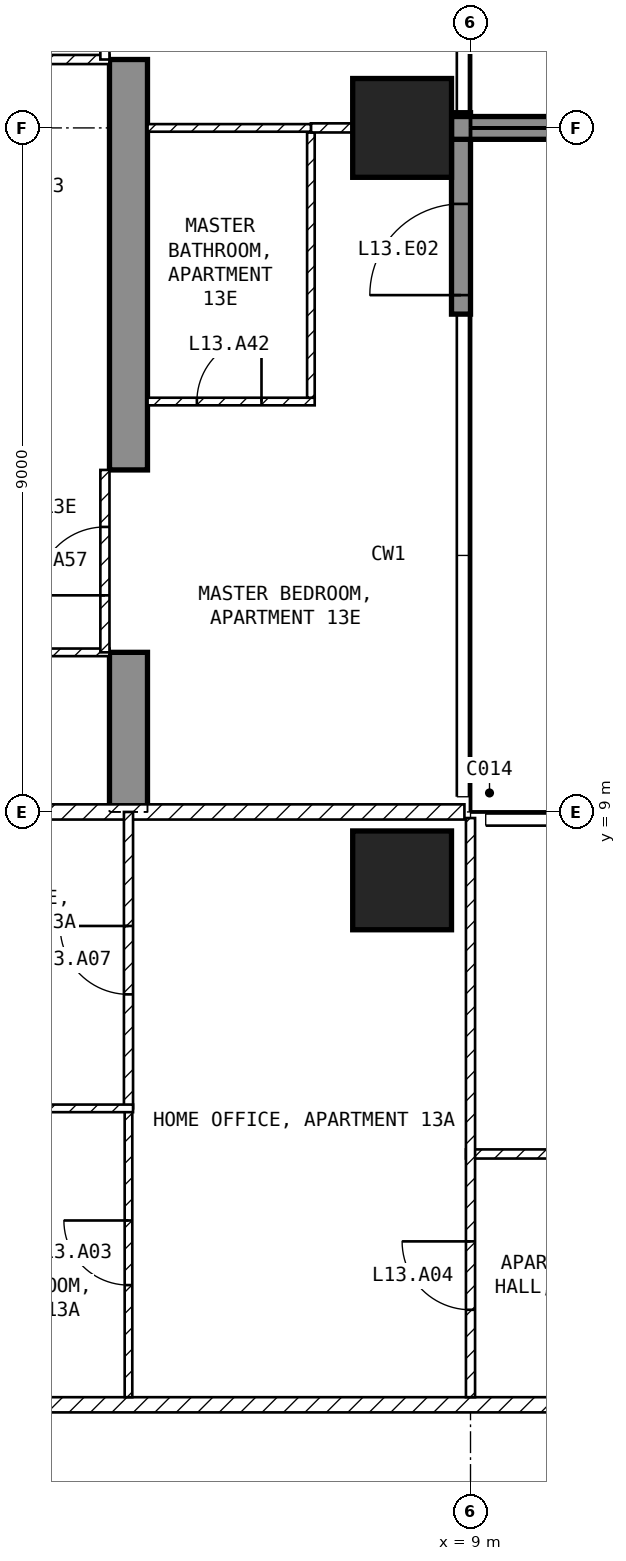
"""IFC4 building model, lengths in metres.
Left out: names, types, materials, properties, quantities, classifications, styles, units other than length and angle.
Written with IfcOpenShell. Run it as: python <this file> out.ifc"""

import sys

from ifc_helpers import new_model, si_unit, direction, frame, frame_2d, origin, origin_2d, place, context, subcontext, project, spatial, polyline, rectangle, outline, extrude, element, fill, save


model = new_model("IFC4")
c1 = context("Model", 3, precision=1e-05, world=origin(), true_north=direction((0.0, 1.0)))
c2 = subcontext(c1, "Body", "Model", "MODEL_VIEW")
j1 = project(units=[si_unit("LENGTHUNIT", "METRE"), si_unit("PLANEANGLEUNIT", "RADIAN")], contexts=[c1])
p1 = place(None, origin())
s1 = spatial("IfcSite", under=j1, at=p1, CompositionType="ELEMENT")
p2 = place(p1, origin())
s2 = spatial("IfcBuilding", under=s1, at=p2, CompositionType="ELEMENT")
p3 = place(p2, frame((0.0, 0.0, 64.5)))
s3 = spatial("IfcBuildingStorey", under=s2, at=p3, CompositionType="ELEMENT", Elevation=64.5)
for number, where, z_axis, x_axis in (
    (1, (8.1, 8.1, -0.25), (0.0, 0.0, 1.0), (1.0, 0.0, 0.0)),
    (2, (8.1, 18.0, -0.25), (0.0, 0.0, 1.0), (1.0, 0.0, 0.0)),
):
    element("IfcColumn", number, at=place(p3, frame(where, z_axis=z_axis, x_axis=x_axis)), inside=s3, PredefinedType="COLUMN", context=c2, shape_type="SweptSolid", body=[
        extrude(rectangle(XDim=1.3, YDim=1.3, at=origin_2d()), origin(), (0.0, 0.0, 1.0), 3.5),
    ])
p4 = place(p3, frame((4.25, 9.0, -0.25), z_axis=(1.0, 0.0, 0.0), x_axis=(0.0, 1.0, 0.0)))
e3 = element("IfcWall", 3, at=p4, inside=s3, PredefinedType="SHEAR", context=c2, shape_type="SweptSolid", body=[
    extrude(outline(polyline([(0.0, 0.0), (2.1, 0.0), (2.1, 2.65), (4.5, 2.65), (4.5, 0.0), (9.9, 0.0), (9.9, 2.65), (12.3, 2.65), (12.3, 0.0), (16.45, 0.0), (16.45, 3.5), (0.0, 3.5), (0.0, 0.0)])), origin(), (0.0, 0.0, 1.0), 0.5),
])
p5 = place(p3, frame((8.875, 15.55, 0.0), z_axis=(0.0, 0.0, 1.0), x_axis=(0.0, 1.0, 0.0)))
e4 = element("IfcWall", 4, at=p5, inside=s3, PredefinedType="SOLIDWALL", context=c2, shape_type="SweptSolid", body=[
    extrude(rectangle(XDim=2.65, YDim=0.25, at=frame_2d((1.325, 0.0))), origin(), (0.0, 0.0, 1.0), 3.25),
])
p6 = place(p5, frame((0.25, 0.0, 0.0)))
e5 = element("IfcOpeningElement", 5, at=p6, cuts=e4, PredefinedType="OPENING", context=c2, shape_type="SweptSolid", body=[
    extrude(rectangle(XDim=1.2, YDim=2.4, at=frame_2d((0.6, 1.2))), frame((0.0, 0.135, 0.0), z_axis=(0.0, -1.0, 0.0), x_axis=(1.0, 0.0, 0.0)), (0.0, 0.0, 1.0), 0.27),
])
p7 = place(p3, frame((8.75, 18.0, 0.0), z_axis=(0.0, 0.0, 1.0), x_axis=(1.0, 0.0, 0.0)))
e6 = element("IfcWall", 6, at=p7, inside=s3, PredefinedType="SOLIDWALL", context=c2, shape_type="SweptSolid", body=[
    extrude(rectangle(XDim=2.95, YDim=0.3, at=frame_2d((1.475, 0.0))), origin(), (0.0, 0.0, 1.0), 3.25),
])
p8 = place(p3, frame((1.1, 1.2, 0.0), z_axis=(0.0, 0.0, 1.0), x_axis=(1.0, 0.0, 0.0)))
e7 = element("IfcWall", 7, at=p8, inside=s3, PredefinedType="PARTITIONING", context=c2, shape_type="SweptSolid", body=[
    extrude(rectangle(XDim=20.5, YDim=0.2, at=frame_2d((10.25, 0.0))), origin(), (0.0, 0.0, 1.0), 3.25),
])
p9 = place(p8, frame((9.2, 0.0, 0.0)))
e8 = element("IfcOpeningElement", 8, at=p9, cuts=e7, PredefinedType="OPENING", context=c2, shape_type="SweptSolid", body=[
    extrude(rectangle(XDim=1.0, YDim=2.1, at=frame_2d((0.5, 1.05))), frame((0.0, 0.11, 0.0), z_axis=(0.0, -1.0, 0.0), x_axis=(1.0, 0.0, 0.0)), (0.0, 0.0, 1.0), 0.22),
])
p10 = place(p3, frame((-8.92, 9.0, 0.0), z_axis=(0.0, 0.0, 1.0), x_axis=(1.0, 0.0, 0.0)))
e9 = element("IfcWall", 9, at=p10, inside=s3, PredefinedType="PARTITIONING", context=c2, shape_type="SweptSolid", body=[
    extrude(rectangle(XDim=17.84, YDim=0.2, at=frame_2d((8.92, 0.0))), origin(), (0.0, 0.0, 1.0), 3.25),
])
p11 = place(p10, frame((8.42, 0.0, 0.0)))
e10 = element("IfcOpeningElement", 10, at=p11, cuts=e9, PredefinedType="OPENING", context=c2, shape_type="SweptSolid", body=[
    extrude(rectangle(XDim=1.0, YDim=2.1, at=frame_2d((0.5, 1.05))), frame((0.0, 0.11, 0.0), z_axis=(0.0, -1.0, 0.0), x_axis=(1.0, 0.0, 0.0)), (0.0, 0.0, 1.0), 0.22),
])
p12 = place(p3, frame((8.94, 4.5, 0.0), z_axis=(0.0, 0.0, 1.0), x_axis=(1.0, 0.0, 0.0)))
e11 = element("IfcWall", 11, at=p12, inside=s3, PredefinedType="PARTITIONING", context=c2, shape_type="SweptSolid", body=[
    extrude(rectangle(XDim=8.46, YDim=0.12, at=frame_2d((4.23, 0.0))), origin(), (0.0, 0.0, 1.0), 3.25),
])
p13 = place(p12, frame((7.11, 0.0, 0.0)))
e12 = element("IfcOpeningElement", 12, at=p13, cuts=e11, PredefinedType="OPENING", context=c2, shape_type="SweptSolid", body=[
    extrude(rectangle(XDim=0.9, YDim=2.1, at=frame_2d((0.45, 1.05))), frame((0.0, 0.07, 0.0), z_axis=(0.0, -1.0, 0.0), x_axis=(1.0, 0.0, 0.0)), (0.0, 0.0, 1.0), 0.14),
])
p14 = place(p12, frame((1.41, 0.0, 0.0)))
e13 = element("IfcOpeningElement", 13, at=p14, cuts=e11, PredefinedType="OPENING", context=c2, shape_type="SweptSolid", body=[
    extrude(rectangle(XDim=0.9, YDim=2.1, at=frame_2d((0.45, 1.05))), frame((0.0, 0.07, 0.0), z_axis=(0.0, -1.0, 0.0), x_axis=(1.0, 0.0, 0.0)), (0.0, 0.0, 1.0), 0.14),
])
p15 = place(p3, frame((9.0, 1.3, 0.0), z_axis=(0.0, 0.0, 1.0), x_axis=(0.0, 1.0, 0.0)))
e14 = element("IfcWall", 14, at=p15, inside=s3, PredefinedType="PARTITIONING", context=c2, shape_type="SweptSolid", body=[
    extrude(rectangle(XDim=7.62, YDim=0.12, at=frame_2d((3.81, 0.0))), origin(), (0.0, 0.0, 1.0), 3.25),
])
p16 = place(p15, frame((1.15, 0.0, 0.0)))
e15 = element("IfcOpeningElement", 15, at=p16, cuts=e14, PredefinedType="OPENING", context=c2, shape_type="SweptSolid", body=[
    extrude(rectangle(XDim=0.9, YDim=2.1, at=frame_2d((0.45, 1.05))), frame((0.0, 0.07, 0.0), z_axis=(0.0, -1.0, 0.0), x_axis=(1.0, 0.0, 0.0)), (0.0, 0.0, 1.0), 0.14),
])
p17 = place(p3, frame((4.5, 1.3, 0.0), z_axis=(0.0, 0.0, 1.0), x_axis=(0.0, 1.0, 0.0)))
e16 = element("IfcWall", 16, at=p17, inside=s3, PredefinedType="PARTITIONING", context=c2, shape_type="SweptSolid", body=[
    extrude(rectangle(XDim=3.8, YDim=0.1, at=frame_2d((1.9, 0.0))), origin(), (0.0, 0.0, 1.0), 3.25),
])
p18 = place(p17, frame((1.475, 0.0, 0.0)))
e17 = element("IfcOpeningElement", 17, at=p18, cuts=e16, PredefinedType="OPENING", context=c2, shape_type="SweptSolid", body=[
    extrude(rectangle(XDim=0.85, YDim=2.1, at=frame_2d((0.425, 1.05))), frame((0.0, 0.06, 0.0), z_axis=(0.0, -1.0, 0.0), x_axis=(1.0, 0.0, 0.0)), (0.0, 0.0, 1.0), 0.12),
])
p19 = place(p3, frame((4.5, 5.1, 0.0), z_axis=(0.0, 0.0, 1.0), x_axis=(0.0, 1.0, 0.0)))
e18 = element("IfcWall", 18, at=p19, inside=s3, PredefinedType="PARTITIONING", context=c2, shape_type="SweptSolid", body=[
    extrude(rectangle(XDim=3.9, YDim=0.12, at=frame_2d((1.95, 0.0))), origin(), (0.0, 0.0, 1.0), 3.25),
])
p20 = place(p19, frame((1.5, 0.0, 0.0)))
e19 = element("IfcOpeningElement", 19, at=p20, cuts=e18, PredefinedType="OPENING", context=c2, shape_type="SweptSolid", body=[
    extrude(rectangle(XDim=0.9, YDim=2.1, at=frame_2d((0.45, 1.05))), frame((0.0, 0.07, 0.0), z_axis=(0.0, -1.0, 0.0), x_axis=(1.0, 0.0, 0.0)), (0.0, 0.0, 1.0), 0.14),
])
p21 = place(p3, frame((1.1, 5.1, 0.0), z_axis=(0.0, 0.0, 1.0), x_axis=(1.0, 0.0, 0.0)))
e20 = element("IfcWall", 20, at=p21, inside=s3, PredefinedType="PARTITIONING", context=c2, shape_type="SweptSolid", body=[
    extrude(rectangle(XDim=3.46, YDim=0.1, at=frame_2d((1.73, 0.0))), origin(), (0.0, 0.0, 1.0), 3.25),
])
p22 = place(p3, frame((2.1, 11.1, 0.0), z_axis=(0.0, 0.0, 1.0), x_axis=(1.0, 0.0, 0.0)))
e21 = element("IfcWall", 21, at=p22, inside=s3, PredefinedType="PARTITIONING", context=c2, shape_type="SweptSolid", body=[
    extrude(rectangle(XDim=2.15, YDim=0.1, at=frame_2d((1.075, 0.0))), origin(), (0.0, 0.0, 1.0), 3.25),
])
p23 = place(p3, frame((-4.25, 18.9, 0.0), z_axis=(0.0, 0.0, 1.0), x_axis=(1.0, 0.0, 0.0)))
e22 = element("IfcWall", 22, at=p23, inside=s3, PredefinedType="PARTITIONING", context=c2, shape_type="SweptSolid", body=[
    extrude(rectangle(XDim=8.5, YDim=0.12, at=frame_2d((4.25, 0.0))), origin(), (0.0, 0.0, 1.0), 3.25),
])
p24 = place(p23, frame((1.925, 0.0, 0.0)))
e23 = element("IfcOpeningElement", 23, at=p24, cuts=e22, PredefinedType="OPENING", context=c2, shape_type="SweptSolid", body=[
    extrude(rectangle(XDim=0.9, YDim=2.1, at=frame_2d((0.45, 1.05))), frame((0.0, 0.07, 0.0), z_axis=(0.0, -1.0, 0.0), x_axis=(1.0, 0.0, 0.0)), (0.0, 0.0, 1.0), 0.14),
])
p25 = place(p3, frame((4.75, 14.4, 0.0), z_axis=(0.0, 0.0, 1.0), x_axis=(1.0, 0.0, 0.0)))
e24 = element("IfcWall", 24, at=p25, inside=s3, PredefinedType="PARTITIONING", context=c2, shape_type="SweptSolid", body=[
    extrude(rectangle(XDim=2.2, YDim=0.1, at=frame_2d((1.1, 0.0))), origin(), (0.0, 0.0, 1.0), 3.25),
])
p26 = place(p25, frame((0.65, 0.0, 0.0)))
e25 = element("IfcOpeningElement", 25, at=p26, cuts=e24, PredefinedType="OPENING", context=c2, shape_type="SweptSolid", body=[
    extrude(rectangle(XDim=0.85, YDim=2.1, at=frame_2d((0.425, 1.05))), frame((0.0, 0.06, 0.0), z_axis=(0.0, -1.0, 0.0), x_axis=(1.0, 0.0, 0.0)), (0.0, 0.0, 1.0), 0.12),
])
p27 = place(p3, frame((6.9, 14.45, 0.0), z_axis=(0.0, 0.0, 1.0), x_axis=(0.0, 1.0, 0.0)))
e26 = element("IfcWall", 26, at=p27, inside=s3, PredefinedType="PARTITIONING", context=c2, shape_type="SweptSolid", body=[
    extrude(rectangle(XDim=3.49, YDim=0.1, at=frame_2d((1.745, 0.0))), origin(), (0.0, 0.0, 1.0), 3.25),
])
p28 = place(p3, frame((6.9, 18.0, 0.0), z_axis=(0.0, 0.0, 1.0), x_axis=(1.0, 0.0, 0.0)))
e27 = element("IfcWall", 27, at=p28, inside=s3, PredefinedType="PARTITIONING", context=c2, shape_type="SweptSolid", body=[
    extrude(rectangle(XDim=0.55, YDim=0.12, at=frame_2d((0.275, 0.0))), origin(), (0.0, 0.0, 1.0), 2.346),
])
p29 = place(p3, frame((4.75, 18.0, 0.0), z_axis=(0.0, 0.0, 1.0), x_axis=(1.0, 0.0, 0.0)))
e28 = element("IfcWall", 28, at=p29, inside=s3, PredefinedType="PARTITIONING", context=c2, shape_type="SweptSolid", body=[
    extrude(rectangle(XDim=2.15, YDim=0.1, at=frame_2d((1.075, 0.0))), origin(), (0.0, 0.0, 1.0), 2.346),
])
p30 = place(p3, frame((4.19, 11.1, 0.0), z_axis=(0.0, 0.0, 1.0), x_axis=(0.0, 1.0, 0.0)))
e29 = element("IfcWall", 29, at=p30, inside=s3, PredefinedType="PARTITIONING", context=c2, shape_type="SweptSolid", body=[
    extrude(rectangle(XDim=2.4, YDim=0.12, at=frame_2d((1.2, 0.0))), origin(), (0.0, 0.0, 1.0), 2.4),
])
p31 = place(p30, frame((0.75, 0.0, 0.0)))
e30 = element("IfcOpeningElement", 30, at=p31, cuts=e29, PredefinedType="OPENING", context=c2, shape_type="SweptSolid", body=[
    extrude(rectangle(XDim=0.9, YDim=2.1, at=frame_2d((0.45, 1.05))), frame((0.0, 0.07, 0.0), z_axis=(0.0, -1.0, 0.0), x_axis=(1.0, 0.0, 0.0)), (0.0, 0.0, 1.0), 0.14),
])
p32 = place(p3, frame((4.19, 18.9, 0.0), z_axis=(0.0, 0.0, 1.0), x_axis=(0.0, 1.0, 0.0)))
e31 = element("IfcWall", 31, at=p32, inside=s3, PredefinedType="PARTITIONING", context=c2, shape_type="SweptSolid", body=[
    extrude(rectangle(XDim=2.4, YDim=0.12, at=frame_2d((1.2, 0.0))), origin(), (0.0, 0.0, 1.0), 2.4),
])
p33 = place(p32, frame((0.55, 0.0, 0.0)))
e32 = element("IfcOpeningElement", 32, at=p33, cuts=e31, PredefinedType="OPENING", context=c2, shape_type="SweptSolid", body=[
    extrude(rectangle(XDim=0.9, YDim=2.1, at=frame_2d((0.45, 1.05))), frame((0.0, 0.07, 0.0), z_axis=(0.0, -1.0, 0.0), x_axis=(1.0, 0.0, 0.0)), (0.0, 0.0, 1.0), 0.14),
])
p34 = place(p6, origin())
e33 = element("IfcDoor", 33, at=p34, inside=s3, OperationType="SINGLE_SWING_LEFT", PredefinedType="DOOR", context=c2, shape_type="SweptSolid", body=[
    extrude(rectangle(XDim=1.2, YDim=2.4, at=frame_2d((0.6, 1.2))), frame((0.0, 0.025, 0.0), z_axis=(0.0, -1.0, 0.0), x_axis=(1.0, 0.0, 0.0)), (0.0, 0.0, 1.0), 0.05),
])
fill(e5, e33)
p35 = place(p18, origin())
e34 = element("IfcDoor", 34, at=p35, inside=s3, OperationType="SINGLE_SWING_RIGHT", PredefinedType="DOOR", context=c2, shape_type="SweptSolid", body=[
    extrude(rectangle(XDim=0.85, YDim=2.1, at=frame_2d((0.425, 1.05))), frame((0.0, 0.025, 0.0), z_axis=(0.0, -1.0, 0.0), x_axis=(1.0, 0.0, 0.0)), (0.0, 0.0, 1.0), 0.05),
])
fill(e17, e34)
p36 = place(p16, origin())
e35 = element("IfcDoor", 35, at=p36, inside=s3, OperationType="SINGLE_SWING_RIGHT", PredefinedType="DOOR", context=c2, shape_type="SweptSolid", body=[
    extrude(rectangle(XDim=0.9, YDim=2.1, at=frame_2d((0.45, 1.05))), frame((0.0, 0.025, 0.0), z_axis=(0.0, -1.0, 0.0), x_axis=(1.0, 0.0, 0.0)), (0.0, 0.0, 1.0), 0.05),
])
fill(e15, e35)
p37 = place(p20, origin())
e36 = element("IfcDoor", 36, at=p37, inside=s3, OperationType="SINGLE_SWING_RIGHT", PredefinedType="DOOR", context=c2, shape_type="SweptSolid", body=[
    extrude(rectangle(XDim=0.9, YDim=2.1, at=frame_2d((0.45, 1.05))), frame((0.0, 0.025, 0.0), z_axis=(0.0, -1.0, 0.0), x_axis=(1.0, 0.0, 0.0)), (0.0, 0.0, 1.0), 0.05),
])
fill(e19, e36)
p38 = place(p26, origin())
e37 = element("IfcDoor", 37, at=p38, inside=s3, OperationType="SINGLE_SWING_RIGHT", PredefinedType="DOOR", context=c2, shape_type="SweptSolid", body=[
    extrude(rectangle(XDim=0.85, YDim=2.1, at=frame_2d((0.425, 1.05))), frame((0.0, 0.025, 0.0), z_axis=(0.0, -1.0, 0.0), x_axis=(1.0, 0.0, 0.0)), (0.0, 0.0, 1.0), 0.05),
])
fill(e25, e37)
p39 = place(p31, origin())
e38 = element("IfcDoor", 38, at=p39, inside=s3, OperationType="SINGLE_SWING_LEFT", PredefinedType="DOOR", context=c2, shape_type="SweptSolid", body=[
    extrude(rectangle(XDim=0.9, YDim=2.1, at=frame_2d((0.45, 1.05))), frame((0.0, 0.025, 0.0), z_axis=(0.0, -1.0, 0.0), x_axis=(1.0, 0.0, 0.0)), (0.0, 0.0, 1.0), 0.05),
])
fill(e30, e38)
save(model, sys.argv[1])
